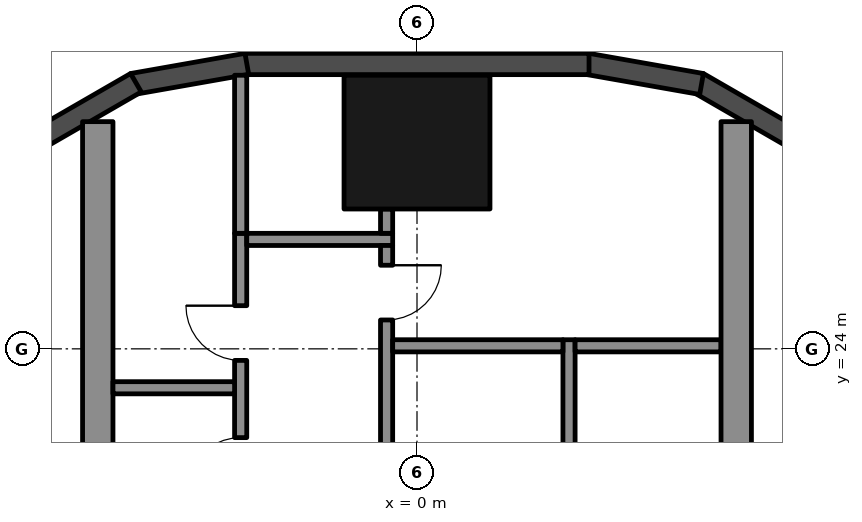
"""IFC4 building model, lengths in metres.
Left out: names, types, materials, properties, quantities, classifications, styles, units other than length and angle.
Written with IfcOpenShell. Run it as: python <this file> out.ifc"""

import sys

from ifc_helpers import new_model, si_unit, direction, frame, frame_2d, origin, origin_2d, place, context, subcontext, project, spatial, rectangle, hollow_rectangle, extrude, element, fill, save


model = new_model("IFC4")
c1 = context("Model", 3, precision=1e-05, world=origin(), true_north=direction((0.0, 1.0)))
c2 = subcontext(c1, "Body", "Model", "MODEL_VIEW")
j1 = project(units=[si_unit("LENGTHUNIT", "METRE"), si_unit("PLANEANGLEUNIT", "RADIAN")], contexts=[c1])
p1 = place(None, origin())
s1 = spatial("IfcSite", under=j1, at=p1, CompositionType="ELEMENT")
p2 = place(p1, origin())
s2 = spatial("IfcBuilding", under=s1, at=p2, CompositionType="ELEMENT")
p3 = place(p2, frame((0.0, 0.0, 231.7)))
s3 = spatial("IfcBuildingStorey", under=s2, at=p3, CompositionType="ELEMENT", Elevation=231.7)
p4 = place(p3, frame((0.0, 27.4, 0.0), z_axis=(0.0, 0.0, 1.0), x_axis=(1.0, 0.0, 0.0)))
e1 = element("IfcColumn", 1, at=p4, inside=s3, PredefinedType="COLUMN", context=c2, shape_type="SweptSolid", body=[
    extrude(hollow_rectangle(XDim=2.4, YDim=2.2, WallThickness=0.06, at=origin_2d()), origin(), (0.0, 0.0, 1.0), 6.0),
])
for number, where, z_axis, x_axis in (
    (2, (6.277, 27.422, 0.0), (0.0, 0.0, 1.0), (-0.866, 0.5, 0.0)),
    (3, (4.68, 28.356, 0.0), (0.0, 0.0, 1.0), (-0.985, 0.174, 0.0)),
):
    element("IfcWall", number, at=place(p3, frame(where, z_axis=z_axis, x_axis=x_axis)), inside=s3, PredefinedType="SOLIDWALL", context=c2, shape_type="SweptSolid", body=[
        extrude(rectangle(XDim=1.91, YDim=0.35, at=frame_2d((0.955, 0.0))), origin(), (0.0, 0.0, 1.0), 5.7),
    ])
p5 = place(p3, frame((2.829, 28.685, 0.0), z_axis=(0.0, 0.0, 1.0), x_axis=(-1.0, 0.0, 0.0)))
e4 = element("IfcWall", 4, at=p5, inside=s3, PredefinedType="SOLIDWALL", context=c2, shape_type="SweptSolid", body=[
    extrude(rectangle(XDim=5.658, YDim=0.35, at=frame_2d((2.829, 0.0))), origin(), (0.0, 0.0, 1.0), 5.7),
])
for number, where, z_axis, x_axis in (
    (5, (-2.799, 28.688, 0.0), (0.0, 0.0, 1.0), (-0.985, -0.174, 0.0)),
    (6, (-4.623, 28.377, 0.0), (0.0, 0.0, 1.0), (-0.866, -0.5, 0.0)),
):
    element("IfcWall", number, at=place(p3, frame(where, z_axis=z_axis, x_axis=x_axis)), inside=s3, PredefinedType="SOLIDWALL", context=c2, shape_type="SweptSolid", body=[
        extrude(rectangle(XDim=1.91, YDim=0.35, at=frame_2d((0.955, 0.0))), origin(), (0.0, 0.0, 1.0), 5.7),
    ])
p6 = place(p3, frame((-5.25, 12.9, 0.0), z_axis=(0.0, 0.0, 1.0), x_axis=(0.0, 1.0, 0.0)))
e7 = element("IfcWall", 7, at=p6, inside=s3, PredefinedType="SHEAR", context=c2, shape_type="SweptSolid", body=[
    extrude(rectangle(XDim=14.837, YDim=0.5, at=frame_2d((7.418, 0.0))), origin(), (0.0, 0.0, 1.0), 5.7),
])
p7 = place(p3, frame((-2.9, 13.3, 0.0), z_axis=(0.0, 0.0, 1.0), x_axis=(0.0, 1.0, 0.0)))
e8 = element("IfcWall", 8, at=p7, inside=s3, PredefinedType="SHEAR", context=c2, shape_type="SweptSolid", body=[
    extrude(rectangle(XDim=12.6, YDim=0.2, at=frame_2d((6.3, 0.0))), origin(), (0.0, 0.0, 1.0), 5.7),
])
p8 = place(p7, frame((0.62, 0.0, 0.0)))
e9 = element("IfcOpeningElement", 9, at=p8, cuts=e8, PredefinedType="OPENING", context=c2, shape_type="SweptSolid", body=[
    extrude(rectangle(XDim=1.1, YDim=2.1, at=frame_2d((0.55, 1.05))), frame((0.0, 0.11, 0.0), z_axis=(0.0, -1.0, 0.0), x_axis=(1.0, 0.0, 0.0)), (0.0, 0.0, 1.0), 0.22),
])
p9 = place(p7, frame((3.16, 0.0, 0.0)))
e10 = element("IfcOpeningElement", 10, at=p9, cuts=e8, PredefinedType="OPENING", context=c2, shape_type="SweptSolid", body=[
    extrude(rectangle(XDim=1.1, YDim=2.1, at=frame_2d((0.55, 1.05))), frame((0.0, 0.11, 0.0), z_axis=(0.0, -1.0, 0.0), x_axis=(1.0, 0.0, 0.0)), (0.0, 0.0, 1.0), 0.22),
])
p10 = place(p7, frame((5.7, 0.0, 0.0)))
e11 = element("IfcOpeningElement", 11, at=p10, cuts=e8, PredefinedType="OPENING", context=c2, shape_type="SweptSolid", body=[
    extrude(rectangle(XDim=1.1, YDim=2.1, at=frame_2d((0.55, 1.05))), frame((0.0, 0.11, 0.0), z_axis=(0.0, -1.0, 0.0), x_axis=(1.0, 0.0, 0.0)), (0.0, 0.0, 1.0), 0.22),
])
p11 = place(p7, frame((8.34, 0.0, 0.0)))
e12 = element("IfcOpeningElement", 12, at=p11, cuts=e8, PredefinedType="OPENING", context=c2, shape_type="SweptSolid", body=[
    extrude(rectangle(XDim=0.9, YDim=2.1, at=frame_2d((0.45, 1.05))), frame((0.0, 0.11, 0.0), z_axis=(0.0, -1.0, 0.0), x_axis=(1.0, 0.0, 0.0)), (0.0, 0.0, 1.0), 0.22),
])
p12 = place(p7, frame((10.51, 0.0, 0.0)))
e13 = element("IfcOpeningElement", 13, at=p12, cuts=e8, PredefinedType="OPENING", context=c2, shape_type="SweptSolid", body=[
    extrude(rectangle(XDim=0.9, YDim=2.1, at=frame_2d((0.45, 1.05))), frame((0.0, 0.11, 0.0), z_axis=(0.0, -1.0, 0.0), x_axis=(1.0, 0.0, 0.0)), (0.0, 0.0, 1.0), 0.22),
])
p13 = place(p3, frame((-0.4, 25.8, 0.0), z_axis=(0.0, 0.0, 1.0), x_axis=(-1.0, 0.0, 0.0)))
e14 = element("IfcWall", 14, at=p13, inside=s3, PredefinedType="SHEAR", context=c2, shape_type="SweptSolid", body=[
    extrude(rectangle(XDim=2.4, YDim=0.2, at=frame_2d((1.2, 0.0))), origin(), (0.0, 0.0, 1.0), 5.7),
])
p14 = place(p3, frame((-0.5, 21.55, 0.0), z_axis=(0.0, 0.0, 1.0), x_axis=(0.0, 1.0, 0.0)))
e15 = element("IfcWall", 15, at=p14, inside=s3, PredefinedType="SHEAR", context=c2, shape_type="SweptSolid", body=[
    extrude(rectangle(XDim=4.15, YDim=0.2, at=frame_2d((2.075, 0.0))), origin(), (0.0, 0.0, 1.0), 5.7),
])
p15 = place(p14, frame((2.925, 0.0, 0.0)))
e16 = element("IfcOpeningElement", 16, at=p15, cuts=e15, PredefinedType="OPENING", context=c2, shape_type="SweptSolid", body=[
    extrude(rectangle(XDim=0.9, YDim=2.1, at=frame_2d((0.45, 1.05))), frame((0.0, 0.11, 0.0), z_axis=(0.0, -1.0, 0.0), x_axis=(1.0, 0.0, 0.0)), (0.0, 0.0, 1.0), 0.22),
])
p16 = place(p3, frame((-3.0, 23.36, 0.0), z_axis=(0.0, 0.0, 1.0), x_axis=(-1.0, 0.0, 0.0)))
e17 = element("IfcWall", 17, at=p16, inside=s3, PredefinedType="SHEAR", context=c2, shape_type="SweptSolid", body=[
    extrude(rectangle(XDim=2.0, YDim=0.2, at=frame_2d((1.0, 0.0))), origin(), (0.0, 0.0, 1.0), 5.7),
])
p17 = place(p3, frame((-0.5, 25.9, 0.0), z_axis=(0.0, 0.0, 1.0), x_axis=(0.0, 1.0, 0.0)))
e18 = element("IfcWall", 18, at=p17, inside=s3, PredefinedType="SHEAR", context=c2, shape_type="SweptSolid", body=[
    extrude(rectangle(XDim=0.4, YDim=0.2, at=frame_2d((0.2, 0.0))), origin(), (0.0, 0.0, 1.0), 5.7),
])
p18 = place(p3, frame((-2.9, 25.9, 0.0), z_axis=(0.0, 0.0, 1.0), x_axis=(0.0, 1.0, 0.0)))
e19 = element("IfcWall", 19, at=p18, inside=s3, PredefinedType="SHEAR", context=c2, shape_type="SweptSolid", body=[
    extrude(rectangle(XDim=2.6, YDim=0.2, at=frame_2d((1.3, 0.0))), origin(), (0.0, 0.0, 1.0), 5.7),
])
p19 = place(p3, frame((2.5, 21.35, 0.0), z_axis=(0.0, 0.0, 1.0), x_axis=(0.0, 1.0, 0.0)))
e20 = element("IfcWall", 20, at=p19, inside=s3, PredefinedType="SHEAR", context=c2, shape_type="SweptSolid", body=[
    extrude(rectangle(XDim=2.8, YDim=0.2, at=frame_2d((1.4, 0.0))), origin(), (0.0, 0.0, 1.0), 5.7),
])
p20 = place(p3, frame((5.0, 24.05, 0.0), z_axis=(0.0, 0.0, 1.0), x_axis=(-1.0, 0.0, 0.0)))
e21 = element("IfcWall", 21, at=p20, inside=s3, PredefinedType="SHEAR", context=c2, shape_type="SweptSolid", body=[
    extrude(rectangle(XDim=2.4, YDim=0.2, at=frame_2d((1.2, 0.0))), origin(), (0.0, 0.0, 1.0), 5.7),
])
p21 = place(p3, frame((2.4, 24.05, 0.0), z_axis=(0.0, 0.0, 1.0), x_axis=(-1.0, 0.0, 0.0)))
e22 = element("IfcWall", 22, at=p21, inside=s3, PredefinedType="SHEAR", context=c2, shape_type="SweptSolid", body=[
    extrude(rectangle(XDim=2.8, YDim=0.2, at=frame_2d((1.4, 0.0))), origin(), (0.0, 0.0, 1.0), 5.7),
])
p22 = place(p3, frame((5.25, 14.606, 0.0), z_axis=(0.0, 0.0, 1.0), x_axis=(0.0, 1.0, 0.0)))
e23 = element("IfcWall", 23, at=p22, inside=s3, PredefinedType="SHEAR", context=c2, shape_type="SweptSolid", body=[
    extrude(rectangle(XDim=13.131, YDim=0.5, at=frame_2d((6.565, 0.0))), origin(), (0.0, 0.0, 1.0), 5.7),
])
p23 = place(p11, origin())
e24 = element("IfcDoor", 24, at=p23, inside=s3, OperationType="SINGLE_SWING_LEFT", PredefinedType="DOOR", context=c2, shape_type="SweptSolid", body=[
    extrude(rectangle(XDim=0.9, YDim=2.1, at=frame_2d((0.45, 1.05))), frame((0.0, 0.025, 0.0), z_axis=(0.0, -1.0, 0.0), x_axis=(1.0, 0.0, 0.0)), (0.0, 0.0, 1.0), 0.05),
])
fill(e12, e24)
p24 = place(p12, origin())
e25 = element("IfcDoor", 25, at=p24, inside=s3, OperationType="SINGLE_SWING_RIGHT", PredefinedType="DOOR", context=c2, shape_type="SweptSolid", body=[
    extrude(rectangle(XDim=0.9, YDim=2.1, at=frame_2d((0.45, 1.05))), frame((0.0, 0.025, 0.0), z_axis=(0.0, -1.0, 0.0), x_axis=(1.0, 0.0, 0.0)), (0.0, 0.0, 1.0), 0.05),
])
fill(e13, e25)
p25 = place(p15, frame((0.9, 0.0, 0.0), z_axis=(0.0, 0.0, 1.0), x_axis=(-1.0, 0.0, 0.0)))
e26 = element("IfcDoor", 26, at=p25, inside=s3, OperationType="SINGLE_SWING_LEFT", PredefinedType="DOOR", context=c2, shape_type="SweptSolid", body=[
    extrude(rectangle(XDim=0.9, YDim=2.1, at=frame_2d((0.45, 1.05))), frame((0.0, 0.025, 0.0), z_axis=(0.0, -1.0, 0.0), x_axis=(1.0, 0.0, 0.0)), (0.0, 0.0, 1.0), 0.05),
])
fill(e16, e26)
save(model, sys.argv[1])
